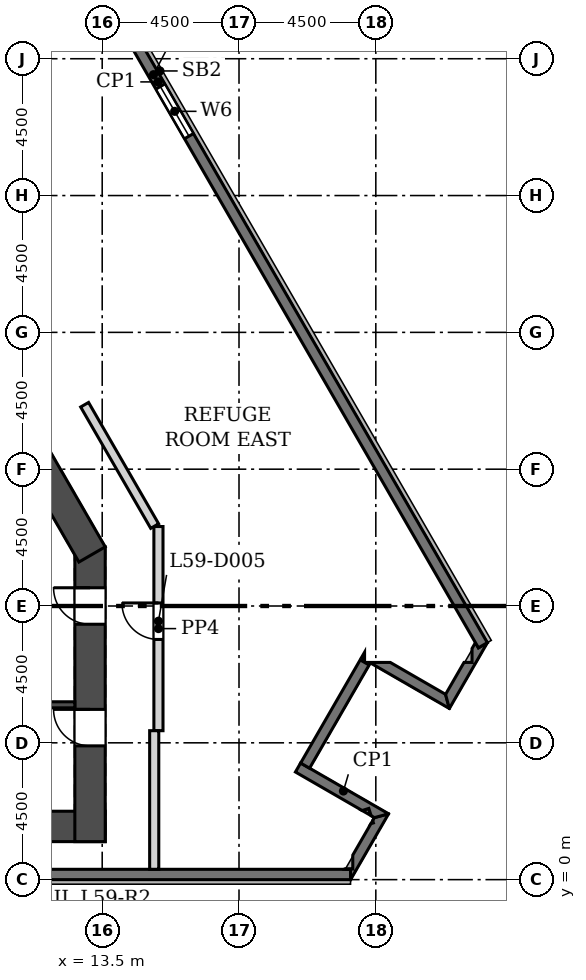
"""IFC4 building model, lengths in metres.
Left out: names, types, materials, properties, quantities, classifications, styles, units other than length and angle.
Written with IfcOpenShell. Run it as: python <this file> out.ifc"""

import sys

from ifc_helpers import new_model, si_unit, direction, frame, frame_2d, origin, place, context, subcontext, project, spatial, polyline, rectangle, outline, extrude, element, fill, save


model = new_model("IFC4")
c1 = context("Model", 3, precision=1e-05, world=origin(), true_north=direction((0.0, 1.0)))
c2 = subcontext(c1, "Body", "Model", "MODEL_VIEW")
j1 = project(units=[si_unit("LENGTHUNIT", "METRE"), si_unit("PLANEANGLEUNIT", "RADIAN")], contexts=[c1])
p1 = place(None, origin())
s1 = spatial("IfcSite", under=j1, at=p1, CompositionType="ELEMENT")
p2 = place(p1, origin())
s2 = spatial("IfcBuilding", under=s1, at=p2, CompositionType="ELEMENT")
p3 = place(p2, frame((0.0, 0.0, 259.5)))
s3 = spatial("IfcBuildingStorey", under=s2, at=p3, CompositionType="ELEMENT", Elevation=259.5)
p4 = place(p3, frame((-13.6, 1.75, 0.0), z_axis=(0.0, 0.0, 1.0), x_axis=(1.0, 0.0, 0.0)))
e1 = element("IfcWall", 1, at=p4, inside=s3, PredefinedType="SHEAR", context=c2, shape_type="SweptSolid", body=[
    extrude(rectangle(XDim=27.2, YDim=1.0, at=frame_2d((13.6, 0.0))), origin(), (0.0, 0.0, 1.0), 7.2),
])
p5 = place(p3, frame((13.1, 1.25, 0.0), z_axis=(0.0, 0.0, 1.0), x_axis=(0.0, 1.0, 0.0)))
e2 = element("IfcWall", 2, at=p5, inside=s3, PredefinedType="SHEAR", context=c2, shape_type="SweptSolid", body=[
    extrude(rectangle(XDim=9.695, YDim=1.0, at=frame_2d((4.848, 0.0))), origin(), (0.0, 0.0, 1.0), 7.2),
])
p6 = place(p5, frame((3.15, 0.0, 0.0)))
e3 = element("IfcOpeningElement", 3, at=p6, cuts=e2, PredefinedType="OPENING", context=c2, shape_type="SweptSolid", body=[
    extrude(rectangle(XDim=1.2, YDim=2.1, at=frame_2d((0.6, 1.05))), frame((0.0, 0.51, 0.0), z_axis=(0.0, -1.0, 0.0), x_axis=(1.0, 0.0, 0.0)), (0.0, 0.0, 1.0), 1.02),
])
p7 = place(p5, frame((7.15, 0.0, 0.0)))
e4 = element("IfcOpeningElement", 4, at=p7, cuts=e2, PredefinedType="OPENING", context=c2, shape_type="SweptSolid", body=[
    extrude(rectangle(XDim=1.2, YDim=2.1, at=frame_2d((0.6, 1.05))), frame((0.0, 0.51, 0.0), z_axis=(0.0, -1.0, 0.0), x_axis=(1.0, 0.0, 0.0)), (0.0, 0.0, 1.0), 1.02),
])
p8 = place(p3, frame((13.167, 10.695, 0.0), z_axis=(0.0, 0.0, 1.0), x_axis=(-0.499995021168, 0.866028278295, 0.0)))
e5 = element("IfcWall", 5, at=p8, inside=s3, PredefinedType="SHEAR", context=c2, shape_type="SweptSolid", body=[
    extrude(rectangle(XDim=8.839, YDim=1.0, at=frame_2d((4.419, 0.0))), origin(), (0.0, 0.0, 1.0), 7.2),
])
p9 = place(p3, frame((-21.669, 0.17, 0.0), z_axis=(0.0, 0.0, 1.0), x_axis=(1.0, 0.0, 0.0)))
e6 = element("IfcWall", 6, at=p9, inside=s3, PredefinedType="SOLIDWALL", context=c2, shape_type="SweptSolid", body=[
    extrude(rectangle(XDim=43.339, YDim=0.34, at=frame_2d((21.669, 0.0))), origin(), (0.0, 0.0, 1.0), 6.8),
])
p10 = place(p3, origin())
e7 = element("IfcWall", 7, at=p10, inside=s3, PredefinedType="SOLIDWALL", context=c2, shape_type="SweptSolid", body=[
    extrude(outline(polyline([(22.396, 1.941), (22.42, 1.866), (22.338, 1.84), (22.396, 1.941)])), origin(), (0.0, 0.0, 1.0), 6.0),
])
p11 = place(p3, origin())
e8 = element("IfcWall", 8, at=p11, inside=s3, PredefinedType="SOLIDWALL", context=c2, shape_type="SweptSolid", body=[
    extrude(outline(polyline([(21.669, -0.001), (21.669, -0.001), (21.669, 0.339), (21.472, 0.339), (21.478, 0.35), (21.742, 0.35), (21.742, 0.807), (22.338, 1.84), (22.42, 1.866), (22.396, 1.941), (22.455, 2.041), (22.92, 2.166), (22.92, 2.166), (21.669, -0.001)])), origin(), (0.0, 0.0, 1.0), 6.8),
])
p12 = place(p3, origin())
e9 = element("IfcWall", 9, at=p12, inside=s3, PredefinedType="SOLIDWALL", context=c2, shape_type="SweptSolid", body=[
    extrude(outline(polyline([(22.051, 2.273), (22.269, 2.343), (22.345, 2.103), (22.051, 2.273)])), origin(), (0.0, 0.0, 1.0), 6.0),
])
p13 = place(p3, origin())
e10 = element("IfcWall", 10, at=p13, inside=s3, PredefinedType="SOLIDWALL", context=c2, shape_type="SweptSolid", body=[
    extrude(outline(polyline([(20.027, 3.836), (20.322, 3.666), (22.921, 2.165), (22.92, 2.165), (22.455, 2.04), (22.345, 2.103), (22.269, 2.343), (22.051, 2.273), (19.856, 3.54), (20.027, 3.836)])), origin(), (0.0, 0.0, 1.0), 6.8),
])
p14 = place(p3, frame((20.174, 3.75, 0.0), z_axis=(0.0, 0.0, 1.0), x_axis=(0.499979589489, 0.866037187478, 0.0)))
e11 = element("IfcWall", 11, at=p14, inside=s3, PredefinedType="SOLIDWALL", context=c2, shape_type="SweptSolid", body=[
    extrude(rectangle(XDim=3.918, YDim=0.34, at=frame_2d((1.959, 0.0))), origin(), (0.0, 0.0, 1.0), 6.8),
])
p15 = place(p3, origin())
e12 = element("IfcWall", 12, at=p15, inside=s3, PredefinedType="SOLIDWALL", context=c2, shape_type="SweptSolid", body=[
    extrude(outline(polyline([(24.92, 5.628), (22.321, 7.129), (22.294, 7.144), (22.976, 7.144), (24.795, 6.094), (24.92, 5.628), (24.92, 5.628)])), origin(), (0.0, 0.0, 1.0), 6.8),
])
p16 = place(p3, origin())
e13 = element("IfcWall", 13, at=p16, inside=s3, PredefinedType="SOLIDWALL", context=c2, shape_type="SweptSolid", body=[
    extrude(outline(polyline([(22.026, 7.299), (22.13, 7.479), (22.13, 7.239), (22.026, 7.299)])), origin(), (0.0, 0.0, 1.0), 6.8),
])
p17 = place(p3, origin())
e14 = element("IfcWall", 14, at=p17, inside=s3, PredefinedType="SOLIDWALL", context=c2, shape_type="SweptSolid", body=[
    extrude(outline(polyline([(25.401, 7.144), (25.665, 7.144), (25.665, 7.601), (25.777, 7.795), (25.875, 7.625), (26.17, 7.795), (26.17, 7.795), (24.919, 5.628), (24.919, 5.628), (24.794, 6.094), (25.401, 7.144)])), origin(), (0.0, 0.0, 1.0), 6.8),
])
p18 = place(p3, frame((26.022, 7.709, 0.0), z_axis=(0.0, 0.0, 1.0), x_axis=(-0.500000891752, 0.866024888931, 0.0)))
e15 = element("IfcWall", 15, at=p18, inside=s3, PredefinedType="SOLIDWALL", context=c2, shape_type="SweptSolid", body=[
    extrude(rectangle(XDim=43.339, YDim=0.34, at=frame_2d((21.669, 0.0))), origin(), (0.0, 0.0, 1.0), 6.8),
])
p19 = place(p18, frame((19.335, 0.0, 0.9)))
e16 = element("IfcOpeningElement", 16, at=p19, cuts=e15, PredefinedType="OPENING", context=c2, shape_type="SweptSolid", body=[
    extrude(rectangle(XDim=1.885, YDim=3.0, at=frame_2d((0.942, 1.5))), frame((0.0, 0.18, 0.0), z_axis=(0.0, -1.0, 0.0), x_axis=(1.0, 0.0, 0.0)), (0.0, 0.0, 1.0), 0.36),
])
p20 = place(p18, frame((34.335, 0.0, 0.9)))
e17 = element("IfcOpeningElement", 17, at=p20, cuts=e15, PredefinedType="OPENING", context=c2, shape_type="SweptSolid", body=[
    extrude(rectangle(XDim=1.885, YDim=3.0, at=frame_2d((0.942, 1.5))), frame((0.0, 0.18, 0.0), z_axis=(0.0, -1.0, 0.0), x_axis=(1.0, 0.0, 0.0)), (0.0, 0.0, 1.0), 0.36),
])
p21 = place(p18, frame((40.335, 0.0, 0.9)))
e18 = element("IfcOpeningElement", 18, at=p21, cuts=e15, PredefinedType="OPENING", context=c2, shape_type="SweptSolid", body=[
    extrude(rectangle(XDim=1.885, YDim=3.0, at=frame_2d((0.942, 1.5))), frame((0.0, 0.18, 0.0), z_axis=(0.0, -1.0, 0.0), x_axis=(1.0, 0.0, 0.0)), (0.0, 0.0, 1.0), 0.36),
])
p22 = place(p3, frame((1.2, 5.75, -0.4), z_axis=(0.0, 0.0, 1.0), x_axis=(1.0, 0.0, 0.0)))
e19 = element("IfcWall", 19, at=p22, inside=s3, PredefinedType="SOLIDWALL", context=c2, shape_type="SweptSolid", body=[
    extrude(rectangle(XDim=11.4, YDim=0.2, at=frame_2d((5.7, 0.0))), origin(), (0.0, 0.0, 1.0), 7.2),
])
p23 = place(p3, frame((15.35, 11.614, 0.0), z_axis=(0.0, 0.0, 1.0), x_axis=(0.0, -1.0, 0.0)))
e20 = element("IfcWall", 20, at=p23, inside=s3, PredefinedType="SOLIDWALL", context=c2, shape_type="SweptSolid", body=[
    extrude(rectangle(XDim=6.715, YDim=0.3, at=frame_2d((3.357, 0.0))), origin(), (0.0, 0.0, 1.0), 6.8),
])
p24 = place(p23, frame((2.514, 0.0, 0.0)))
e21 = element("IfcOpeningElement", 21, at=p24, cuts=e20, PredefinedType="OPENING", context=c2, shape_type="SweptSolid", body=[
    extrude(rectangle(XDim=1.2, YDim=2.1, at=frame_2d((0.6, 1.05))), frame((0.0, 0.16, 0.0), z_axis=(0.0, -1.0, 0.0), x_axis=(1.0, 0.0, 0.0)), (0.0, 0.0, 1.0), 0.32),
])
p25 = place(p3, frame((12.922, 15.62, 0.0), z_axis=(0.0, 0.0, 1.0), x_axis=(0.49997925212, -0.866037382247, 0.0)))
e22 = element("IfcWall", 22, at=p25, inside=s3, PredefinedType="SOLIDWALL", context=c2, shape_type="SweptSolid", body=[
    extrude(rectangle(XDim=4.609, YDim=0.3, at=frame_2d((2.304, 0.0))), origin(), (0.0, 0.0, 1.0), 6.8),
])
p26 = place(p3, frame((15.211, 4.899, 0.0), z_axis=(0.0, 0.0, 1.0), x_axis=(0.0, -1.0, 0.0)))
e23 = element("IfcWall", 23, at=p26, inside=s3, PredefinedType="SOLIDWALL", context=c2, shape_type="SweptSolid", body=[
    extrude(rectangle(XDim=4.559, YDim=0.3, at=frame_2d((2.279, 0.0))), origin(), (0.0, 0.0, 1.0), 6.8),
])
p27 = place(p19, origin())
e24 = element("IfcWindow", 24, at=p27, inside=s3, PartitioningType="SINGLE_PANEL", PredefinedType="WINDOW", context=c2, shape_type="SweptSolid", body=[
    extrude(rectangle(XDim=1.885, YDim=3.0, at=frame_2d((0.942, 1.5))), frame((0.0, 0.11, 0.0), z_axis=(0.0, -1.0, 0.0), x_axis=(1.0, 0.0, 0.0)), (0.0, 0.0, 1.0), 0.06),
])
fill(e16, e24)
p28 = place(p6, origin())
e25 = element("IfcDoor", 25, at=p28, inside=s3, OperationType="SINGLE_SWING_RIGHT", PredefinedType="DOOR", context=c2, shape_type="SweptSolid", body=[
    extrude(rectangle(XDim=1.2, YDim=2.1, at=frame_2d((0.6, 1.05))), frame((0.0, 0.025, 0.0), z_axis=(0.0, -1.0, 0.0), x_axis=(1.0, 0.0, 0.0)), (0.0, 0.0, 1.0), 0.05),
])
fill(e3, e25)
p29 = place(p7, origin())
e26 = element("IfcDoor", 26, at=p29, inside=s3, OperationType="SINGLE_SWING_RIGHT", PredefinedType="DOOR", context=c2, shape_type="SweptSolid", body=[
    extrude(rectangle(XDim=1.2, YDim=2.1, at=frame_2d((0.6, 1.05))), frame((0.0, 0.025, 0.0), z_axis=(0.0, -1.0, 0.0), x_axis=(1.0, 0.0, 0.0)), (0.0, 0.0, 1.0), 0.05),
])
fill(e4, e26)
p30 = place(p24, frame((1.2, 0.0, 0.0), z_axis=(0.0, 0.0, 1.0), x_axis=(-1.0, 0.0, 0.0)))
e27 = element("IfcDoor", 27, at=p30, inside=s3, OperationType="SINGLE_SWING_RIGHT", PredefinedType="DOOR", context=c2, shape_type="SweptSolid", body=[
    extrude(rectangle(XDim=1.2, YDim=2.1, at=frame_2d((0.6, 1.05))), frame((0.0, 0.025, 0.0), z_axis=(0.0, -1.0, 0.0), x_axis=(1.0, 0.0, 0.0)), (0.0, 0.0, 1.0), 0.05),
])
fill(e21, e27)
save(model, sys.argv[1])
